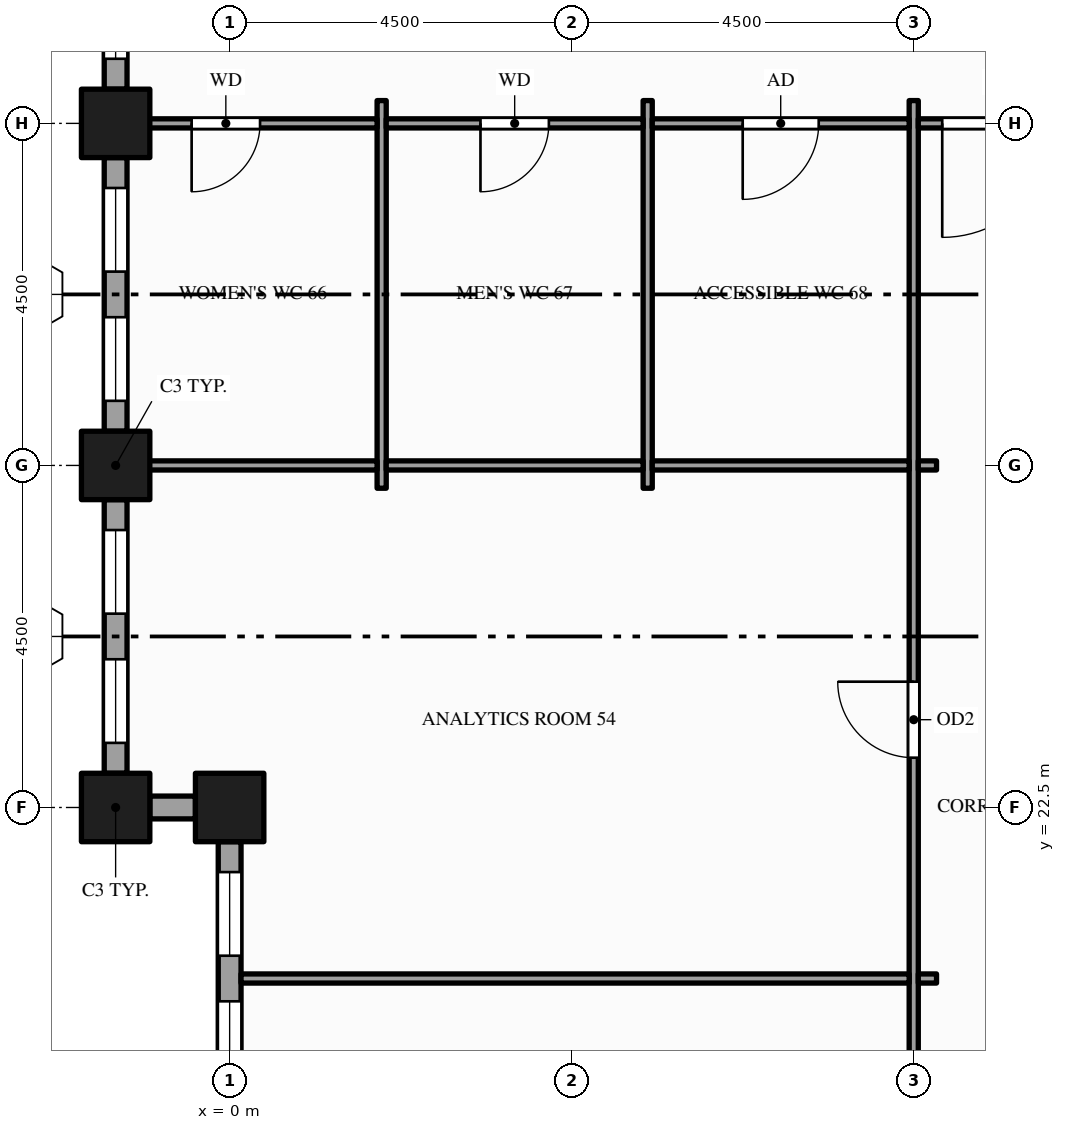
"""IFC4 building model, lengths in metres.
Left out: names, types, materials, properties, quantities, classifications, styles, units other than length and angle.
Written with IfcOpenShell. Run it as: python <this file> out.ifc"""

import sys

from ifc_helpers import new_model, si_unit, direction, frame, frame_2d, origin, origin_2d, place, context, subcontext, project, spatial, rectangle, hollow_rectangle, extrude, element, fill, save


model = new_model("IFC4")
c1 = context("Model", 3, precision=1e-05, world=origin(), true_north=direction((0.0, 1.0)))
c2 = subcontext(c1, "Body", "Model", "MODEL_VIEW")
j1 = project(units=[si_unit("LENGTHUNIT", "METRE"), si_unit("PLANEANGLEUNIT", "RADIAN")], contexts=[c1])
p1 = place(None, origin())
s1 = spatial("IfcSite", under=j1, at=p1, CompositionType="ELEMENT")
p2 = place(p1, origin())
s2 = spatial("IfcBuilding", under=s1, at=p2, CompositionType="ELEMENT")
p3 = place(p2, frame((0.0, 0.0, 155.0)))
s3 = spatial("IfcBuildingStorey", under=s2, at=p3, CompositionType="ELEMENT", Elevation=155.0)
for number, where, z_axis, x_axis in (
    (1, (-1.5, 22.5, -0.15), (0.0, 0.0, 1.0), (1.0, 0.0, 0.0)),
    (2, (-1.5, 27.0, -0.15), (0.0, 0.0, 1.0), (1.0, 0.0, 0.0)),
    (3, (-1.5, 31.5, -0.15), (0.0, 0.0, 1.0), (1.0, 0.0, 0.0)),
    (4, (0.0, 22.5, -0.15), (0.0, 0.0, 1.0), (1.0, 0.0, 0.0)),
):
    element("IfcColumn", number, at=place(p3, frame(where, z_axis=z_axis, x_axis=x_axis)), inside=s3, PredefinedType="COLUMN", context=c2, shape_type="SweptSolid", body=[
        extrude(hollow_rectangle(XDim=0.9, YDim=0.9, WallThickness=0.045, at=origin_2d()), origin(), (0.0, 0.0, 1.0), 4.0),
    ])
p4 = place(p3, frame((-1.5, 35.55, 0.0), z_axis=(0.0, 0.0, 1.0), x_axis=(0.0, -1.0, 0.0)))
e5 = element("IfcWall", 5, at=p4, inside=s3, PredefinedType="STANDARD", context=c2, shape_type="SweptSolid", body=[
    extrude(rectangle(XDim=3.6, YDim=0.3, at=frame_2d((1.8, 0.0))), origin(), (0.0, 0.0, 1.0), 3.149),
])
p5 = place(p4, frame((0.4, 0.0, 0.9)))
e6 = element("IfcOpeningElement", 6, at=p5, cuts=e5, PredefinedType="OPENING", context=c2, shape_type="SweptSolid", body=[
    extrude(rectangle(XDim=1.1, YDim=2.0, at=frame_2d((0.55, 1.0))), frame((0.0, 0.16, 0.0), z_axis=(0.0, -1.0, 0.0), x_axis=(1.0, 0.0, 0.0)), (0.0, 0.0, 1.0), 0.32),
])
p6 = place(p4, frame((2.1, 0.0, 0.9)))
e7 = element("IfcOpeningElement", 7, at=p6, cuts=e5, PredefinedType="OPENING", context=c2, shape_type="SweptSolid", body=[
    extrude(rectangle(XDim=1.1, YDim=2.0, at=frame_2d((0.55, 1.0))), frame((0.0, 0.16, 0.0), z_axis=(0.0, -1.0, 0.0), x_axis=(1.0, 0.0, 0.0)), (0.0, 0.0, 1.0), 0.32),
])
p7 = place(p3, frame((-1.5, 31.05, 0.0), z_axis=(0.0, 0.0, 1.0), x_axis=(0.0, -1.0, 0.0)))
e8 = element("IfcWall", 8, at=p7, inside=s3, PredefinedType="STANDARD", context=c2, shape_type="SweptSolid", body=[
    extrude(rectangle(XDim=3.6, YDim=0.3, at=frame_2d((1.8, 0.0))), origin(), (0.0, 0.0, 1.0), 3.149),
])
p8 = place(p7, frame((0.4, 0.0, 0.9)))
e9 = element("IfcOpeningElement", 9, at=p8, cuts=e8, PredefinedType="OPENING", context=c2, shape_type="SweptSolid", body=[
    extrude(rectangle(XDim=1.1, YDim=2.0, at=frame_2d((0.55, 1.0))), frame((0.0, 0.16, 0.0), z_axis=(0.0, -1.0, 0.0), x_axis=(1.0, 0.0, 0.0)), (0.0, 0.0, 1.0), 0.32),
])
p9 = place(p7, frame((2.1, 0.0, 0.9)))
e10 = element("IfcOpeningElement", 10, at=p9, cuts=e8, PredefinedType="OPENING", context=c2, shape_type="SweptSolid", body=[
    extrude(rectangle(XDim=1.1, YDim=2.0, at=frame_2d((0.55, 1.0))), frame((0.0, 0.16, 0.0), z_axis=(0.0, -1.0, 0.0), x_axis=(1.0, 0.0, 0.0)), (0.0, 0.0, 1.0), 0.32),
])
p10 = place(p3, frame((-1.5, 26.55, 0.0), z_axis=(0.0, 0.0, 1.0), x_axis=(0.0, -1.0, 0.0)))
e11 = element("IfcWall", 11, at=p10, inside=s3, PredefinedType="STANDARD", context=c2, shape_type="SweptSolid", body=[
    extrude(rectangle(XDim=3.6, YDim=0.3, at=frame_2d((1.8, 0.0))), origin(), (0.0, 0.0, 1.0), 3.149),
])
p11 = place(p10, frame((0.4, 0.0, 0.9)))
e12 = element("IfcOpeningElement", 12, at=p11, cuts=e11, PredefinedType="OPENING", context=c2, shape_type="SweptSolid", body=[
    extrude(rectangle(XDim=1.1, YDim=2.0, at=frame_2d((0.55, 1.0))), frame((0.0, 0.16, 0.0), z_axis=(0.0, -1.0, 0.0), x_axis=(1.0, 0.0, 0.0)), (0.0, 0.0, 1.0), 0.32),
])
p12 = place(p10, frame((2.1, 0.0, 0.9)))
e13 = element("IfcOpeningElement", 13, at=p12, cuts=e11, PredefinedType="OPENING", context=c2, shape_type="SweptSolid", body=[
    extrude(rectangle(XDim=1.1, YDim=2.0, at=frame_2d((0.55, 1.0))), frame((0.0, 0.16, 0.0), z_axis=(0.0, -1.0, 0.0), x_axis=(1.0, 0.0, 0.0)), (0.0, 0.0, 1.0), 0.32),
])
p13 = place(p3, frame((-1.05, 22.5, 0.0), z_axis=(0.0, 0.0, 1.0), x_axis=(1.0, 0.0, 0.0)))
e14 = element("IfcWall", 14, at=p13, inside=s3, PredefinedType="STANDARD", context=c2, shape_type="SweptSolid", body=[
    extrude(rectangle(XDim=0.6, YDim=0.3, at=frame_2d((0.3, 0.0))), origin(), (0.0, 0.0, 1.0), 3.149),
])
p14 = place(p3, frame((0.0, 22.05, 0.0), z_axis=(0.0, 0.0, 1.0), x_axis=(0.0, -1.0, 0.0)))
e15 = element("IfcWall", 15, at=p14, inside=s3, PredefinedType="STANDARD", context=c2, shape_type="SweptSolid", body=[
    extrude(rectangle(XDim=3.6, YDim=0.3, at=frame_2d((1.8, 0.0))), origin(), (0.0, 0.0, 1.0), 3.149),
])
p15 = place(p14, frame((0.4, 0.0, 0.9)))
e16 = element("IfcOpeningElement", 16, at=p15, cuts=e15, PredefinedType="OPENING", context=c2, shape_type="SweptSolid", body=[
    extrude(rectangle(XDim=1.1, YDim=2.0, at=frame_2d((0.55, 1.0))), frame((0.0, 0.16, 0.0), z_axis=(0.0, -1.0, 0.0), x_axis=(1.0, 0.0, 0.0)), (0.0, 0.0, 1.0), 0.32),
])
p16 = place(p14, frame((2.1, 0.0, 0.9)))
e17 = element("IfcOpeningElement", 17, at=p16, cuts=e15, PredefinedType="OPENING", context=c2, shape_type="SweptSolid", body=[
    extrude(rectangle(XDim=1.1, YDim=2.0, at=frame_2d((0.55, 1.0))), frame((0.0, 0.16, 0.0), z_axis=(0.0, -1.0, 0.0), x_axis=(1.0, 0.0, 0.0)), (0.0, 0.0, 1.0), 0.32),
])
for number, where, z_axis, x_axis in (
    (18, (2.0, 26.7, 0.0), (0.0, 0.0, 1.0), (0.0, 1.0, 0.0)),
    (19, (5.5, 26.7, 0.0), (0.0, 0.0, 1.0), (0.0, 1.0, 0.0)),
):
    element("IfcWall", number, at=place(p3, frame(where, z_axis=z_axis, x_axis=x_axis)), inside=s3, PredefinedType="PARTITIONING", context=c2, shape_type="SweptSolid", body=[
        extrude(rectangle(XDim=5.1, YDim=0.12, at=frame_2d((2.55, 0.0))), origin(), (0.0, 0.0, 1.0), 3.85),
    ])
p17 = place(p3, frame((9.0, 13.2, 0.0), z_axis=(0.0, 0.0, 1.0), x_axis=(0.0, 1.0, 0.0)))
e20 = element("IfcWall", 20, at=p17, inside=s3, PredefinedType="PARTITIONING", context=c2, shape_type="SweptSolid", body=[
    extrude(rectangle(XDim=18.6, YDim=0.12, at=frame_2d((9.3, 0.0))), origin(), (0.0, 0.0, 1.0), 2.6),
])
p18 = place(p17, frame((3.175, 0.0, 0.0)))
e21 = element("IfcOpeningElement", 21, at=p18, cuts=e20, PredefinedType="OPENING", context=c2, shape_type="SweptSolid", body=[
    extrude(rectangle(XDim=1.0, YDim=2.1, at=frame_2d((0.5, 1.05))), frame((0.0, 0.07, 0.0), z_axis=(0.0, -1.0, 0.0), x_axis=(1.0, 0.0, 0.0)), (0.0, 0.0, 1.0), 0.14),
])
p19 = place(p17, frame((9.955, 0.0, 0.0)))
e22 = element("IfcOpeningElement", 22, at=p19, cuts=e20, PredefinedType="OPENING", context=c2, shape_type="SweptSolid", body=[
    extrude(rectangle(XDim=1.0, YDim=2.1, at=frame_2d((0.5, 1.05))), frame((0.0, 0.07, 0.0), z_axis=(0.0, -1.0, 0.0), x_axis=(1.0, 0.0, 0.0)), (0.0, 0.0, 1.0), 0.14),
])
p20 = place(p3, frame((0.15, 20.25, 0.0), z_axis=(0.0, 0.0, 1.0), x_axis=(1.0, 0.0, 0.0)))
e23 = element("IfcWall", 23, at=p20, inside=s3, PredefinedType="PARTITIONING", context=c2, shape_type="SweptSolid", body=[
    extrude(rectangle(XDim=8.79, YDim=0.12, at=frame_2d((4.395, 0.0))), origin(), (0.0, 0.0, 1.0), 2.87),
])
p21 = place(p3, frame((9.06, 20.25, 0.0), z_axis=(0.0, 0.0, 1.0), x_axis=(1.0, 0.0, 0.0)))
e24 = element("IfcWall", 24, at=p21, inside=s3, PredefinedType="PARTITIONING", context=c2, shape_type="SweptSolid", body=[
    extrude(rectangle(XDim=0.24, YDim=0.12, at=frame_2d((0.12, 0.0))), origin(), (0.0, 0.0, 1.0), 2.87),
])
p22 = place(p3, frame((-1.35, 27.0, 0.0), z_axis=(0.0, 0.0, 1.0), x_axis=(1.0, 0.0, 0.0)))
e25 = element("IfcWall", 25, at=p22, inside=s3, PredefinedType="PARTITIONING", context=c2, shape_type="SweptSolid", body=[
    extrude(rectangle(XDim=3.29, YDim=0.12, at=frame_2d((1.645, 0.0))), origin(), (0.0, 0.0, 1.0), 2.87),
])
for number, where, z_axis, x_axis in (
    (26, (2.06, 27.0, 0.0), (0.0, 0.0, 1.0), (1.0, 0.0, 0.0)),
    (27, (5.56, 27.0, 0.0), (0.0, 0.0, 1.0), (1.0, 0.0, 0.0)),
):
    element("IfcWall", number, at=place(p3, frame(where, z_axis=z_axis, x_axis=x_axis)), inside=s3, PredefinedType="PARTITIONING", context=c2, shape_type="SweptSolid", body=[
        extrude(rectangle(XDim=3.38, YDim=0.12, at=frame_2d((1.69, 0.0))), origin(), (0.0, 0.0, 1.0), 2.87),
    ])
p23 = place(p3, frame((9.06, 27.0, 0.0), z_axis=(0.0, 0.0, 1.0), x_axis=(1.0, 0.0, 0.0)))
e28 = element("IfcWall", 28, at=p23, inside=s3, PredefinedType="PARTITIONING", context=c2, shape_type="SweptSolid", body=[
    extrude(rectangle(XDim=0.24, YDim=0.12, at=frame_2d((0.12, 0.0))), origin(), (0.0, 0.0, 1.0), 2.87),
])
p24 = place(p3, frame((-1.35, 31.5, 0.0), z_axis=(0.0, 0.0, 1.0), x_axis=(1.0, 0.0, 0.0)))
e29 = element("IfcWall", 29, at=p24, inside=s3, PredefinedType="PARTITIONING", context=c2, shape_type="SweptSolid", body=[
    extrude(rectangle(XDim=3.29, YDim=0.12, at=frame_2d((1.645, 0.0))), origin(), (0.0, 0.0, 1.0), 2.87),
])
p25 = place(p24, frame((0.85, 0.0, 0.0)))
e30 = element("IfcOpeningElement", 30, at=p25, cuts=e29, PredefinedType="OPENING", context=c2, shape_type="SweptSolid", body=[
    extrude(rectangle(XDim=0.9, YDim=2.1, at=frame_2d((0.45, 1.05))), frame((0.0, 0.07, 0.0), z_axis=(0.0, -1.0, 0.0), x_axis=(1.0, 0.0, 0.0)), (0.0, 0.0, 1.0), 0.14),
])
p26 = place(p3, frame((2.06, 31.5, 0.0), z_axis=(0.0, 0.0, 1.0), x_axis=(1.0, 0.0, 0.0)))
e31 = element("IfcWall", 31, at=p26, inside=s3, PredefinedType="PARTITIONING", context=c2, shape_type="SweptSolid", body=[
    extrude(rectangle(XDim=3.38, YDim=0.12, at=frame_2d((1.69, 0.0))), origin(), (0.0, 0.0, 1.0), 2.87),
])
p27 = place(p26, frame((1.24, 0.0, 0.0)))
e32 = element("IfcOpeningElement", 32, at=p27, cuts=e31, PredefinedType="OPENING", context=c2, shape_type="SweptSolid", body=[
    extrude(rectangle(XDim=0.9, YDim=2.1, at=frame_2d((0.45, 1.05))), frame((0.0, 0.07, 0.0), z_axis=(0.0, -1.0, 0.0), x_axis=(1.0, 0.0, 0.0)), (0.0, 0.0, 1.0), 0.14),
])
p28 = place(p3, frame((5.56, 31.5, 0.0), z_axis=(0.0, 0.0, 1.0), x_axis=(1.0, 0.0, 0.0)))
e33 = element("IfcWall", 33, at=p28, inside=s3, PredefinedType="PARTITIONING", context=c2, shape_type="SweptSolid", body=[
    extrude(rectangle(XDim=3.38, YDim=0.12, at=frame_2d((1.69, 0.0))), origin(), (0.0, 0.0, 1.0), 2.87),
])
p29 = place(p28, frame((1.19, 0.0, 0.0)))
e34 = element("IfcOpeningElement", 34, at=p29, cuts=e33, PredefinedType="OPENING", context=c2, shape_type="SweptSolid", body=[
    extrude(rectangle(XDim=1.0, YDim=2.1, at=frame_2d((0.5, 1.05))), frame((0.0, 0.07, 0.0), z_axis=(0.0, -1.0, 0.0), x_axis=(1.0, 0.0, 0.0)), (0.0, 0.0, 1.0), 0.14),
])
p30 = place(p3, frame((9.06, 31.5, 0.0), z_axis=(0.0, 0.0, 1.0), x_axis=(1.0, 0.0, 0.0)))
e35 = element("IfcWall", 35, at=p30, inside=s3, PredefinedType="PARTITIONING", context=c2, shape_type="SweptSolid", body=[
    extrude(rectangle(XDim=2.13, YDim=0.12, at=frame_2d((1.065, 0.0))), origin(), (0.0, 0.0, 1.0), 2.87),
])
p31 = place(p30, frame((0.315, 0.0, 0.0)))
e36 = element("IfcOpeningElement", 36, at=p31, cuts=e35, PredefinedType="OPENING", context=c2, shape_type="SweptSolid", body=[
    extrude(rectangle(XDim=1.5, YDim=2.1, at=frame_2d((0.75, 1.05))), frame((0.0, 0.07, 0.0), z_axis=(0.0, -1.0, 0.0), x_axis=(1.0, 0.0, 0.0)), (0.0, 0.0, 1.0), 0.14),
])
p32 = place(p6, origin())
e37 = element("IfcWindow", 37, at=p32, inside=s3, PartitioningType="SINGLE_PANEL", PredefinedType="WINDOW", context=c2, shape_type="SweptSolid", body=[
    extrude(rectangle(XDim=1.1, YDim=2.0, at=frame_2d((0.55, 1.0))), frame((0.0, 0.03, 0.0), z_axis=(0.0, -1.0, 0.0), x_axis=(1.0, 0.0, 0.0)), (0.0, 0.0, 1.0), 0.06),
])
fill(e7, e37)
p33 = place(p8, origin())
e38 = element("IfcWindow", 38, at=p33, inside=s3, PartitioningType="SINGLE_PANEL", PredefinedType="WINDOW", context=c2, shape_type="SweptSolid", body=[
    extrude(rectangle(XDim=1.1, YDim=2.0, at=frame_2d((0.55, 1.0))), frame((0.0, 0.03, 0.0), z_axis=(0.0, -1.0, 0.0), x_axis=(1.0, 0.0, 0.0)), (0.0, 0.0, 1.0), 0.06),
])
fill(e9, e38)
p34 = place(p9, origin())
e39 = element("IfcWindow", 39, at=p34, inside=s3, PartitioningType="SINGLE_PANEL", PredefinedType="WINDOW", context=c2, shape_type="SweptSolid", body=[
    extrude(rectangle(XDim=1.1, YDim=2.0, at=frame_2d((0.55, 1.0))), frame((0.0, 0.03, 0.0), z_axis=(0.0, -1.0, 0.0), x_axis=(1.0, 0.0, 0.0)), (0.0, 0.0, 1.0), 0.06),
])
fill(e10, e39)
p35 = place(p11, origin())
e40 = element("IfcWindow", 40, at=p35, inside=s3, PartitioningType="SINGLE_PANEL", PredefinedType="WINDOW", context=c2, shape_type="SweptSolid", body=[
    extrude(rectangle(XDim=1.1, YDim=2.0, at=frame_2d((0.55, 1.0))), frame((0.0, 0.03, 0.0), z_axis=(0.0, -1.0, 0.0), x_axis=(1.0, 0.0, 0.0)), (0.0, 0.0, 1.0), 0.06),
])
fill(e12, e40)
p36 = place(p12, origin())
e41 = element("IfcWindow", 41, at=p36, inside=s3, PartitioningType="SINGLE_PANEL", PredefinedType="WINDOW", context=c2, shape_type="SweptSolid", body=[
    extrude(rectangle(XDim=1.1, YDim=2.0, at=frame_2d((0.55, 1.0))), frame((0.0, 0.03, 0.0), z_axis=(0.0, -1.0, 0.0), x_axis=(1.0, 0.0, 0.0)), (0.0, 0.0, 1.0), 0.06),
])
fill(e13, e41)
p37 = place(p15, origin())
e42 = element("IfcWindow", 42, at=p37, inside=s3, PartitioningType="SINGLE_PANEL", PredefinedType="WINDOW", context=c2, shape_type="SweptSolid", body=[
    extrude(rectangle(XDim=1.1, YDim=2.0, at=frame_2d((0.55, 1.0))), frame((0.0, 0.03, 0.0), z_axis=(0.0, -1.0, 0.0), x_axis=(1.0, 0.0, 0.0)), (0.0, 0.0, 1.0), 0.06),
])
fill(e16, e42)
p38 = place(p16, origin())
e43 = element("IfcWindow", 43, at=p38, inside=s3, PartitioningType="SINGLE_PANEL", PredefinedType="WINDOW", context=c2, shape_type="SweptSolid", body=[
    extrude(rectangle(XDim=1.1, YDim=2.0, at=frame_2d((0.55, 1.0))), frame((0.0, 0.03, 0.0), z_axis=(0.0, -1.0, 0.0), x_axis=(1.0, 0.0, 0.0)), (0.0, 0.0, 1.0), 0.06),
])
fill(e17, e43)
p39 = place(p31, origin())
e44 = element("IfcDoor", 44, at=p39, inside=s3, OperationType="SINGLE_SWING_LEFT", PredefinedType="DOOR", context=c2, shape_type="SweptSolid", body=[
    extrude(rectangle(XDim=1.5, YDim=2.1, at=frame_2d((0.75, 1.05))), frame((0.0, 0.025, 0.0), z_axis=(0.0, -1.0, 0.0), x_axis=(1.0, 0.0, 0.0)), (0.0, 0.0, 1.0), 0.05),
])
fill(e36, e44)
p40 = place(p19, origin())
e45 = element("IfcDoor", 45, at=p40, inside=s3, OperationType="SINGLE_SWING_RIGHT", PredefinedType="DOOR", context=c2, shape_type="SweptSolid", body=[
    extrude(rectangle(XDim=1.0, YDim=2.1, at=frame_2d((0.5, 1.05))), frame((0.0, 0.025, 0.0), z_axis=(0.0, -1.0, 0.0), x_axis=(1.0, 0.0, 0.0)), (0.0, 0.0, 1.0), 0.05),
])
fill(e22, e45)
p41 = place(p25, origin())
e46 = element("IfcDoor", 46, at=p41, inside=s3, OperationType="SINGLE_SWING_LEFT", PredefinedType="DOOR", context=c2, shape_type="SweptSolid", body=[
    extrude(rectangle(XDim=0.9, YDim=2.1, at=frame_2d((0.45, 1.05))), frame((0.0, 0.025, 0.0), z_axis=(0.0, -1.0, 0.0), x_axis=(1.0, 0.0, 0.0)), (0.0, 0.0, 1.0), 0.05),
])
fill(e30, e46)
p42 = place(p27, origin())
e47 = element("IfcDoor", 47, at=p42, inside=s3, OperationType="SINGLE_SWING_LEFT", PredefinedType="DOOR", context=c2, shape_type="SweptSolid", body=[
    extrude(rectangle(XDim=0.9, YDim=2.1, at=frame_2d((0.45, 1.05))), frame((0.0, 0.025, 0.0), z_axis=(0.0, -1.0, 0.0), x_axis=(1.0, 0.0, 0.0)), (0.0, 0.0, 1.0), 0.05),
])
fill(e32, e47)
p43 = place(p29, origin())
e48 = element("IfcDoor", 48, at=p43, inside=s3, OperationType="SINGLE_SWING_LEFT", PredefinedType="DOOR", context=c2, shape_type="SweptSolid", body=[
    extrude(rectangle(XDim=1.0, YDim=2.1, at=frame_2d((0.5, 1.05))), frame((0.0, 0.025, 0.0), z_axis=(0.0, -1.0, 0.0), x_axis=(1.0, 0.0, 0.0)), (0.0, 0.0, 1.0), 0.05),
])
fill(e34, e48)
save(model, sys.argv[1])
